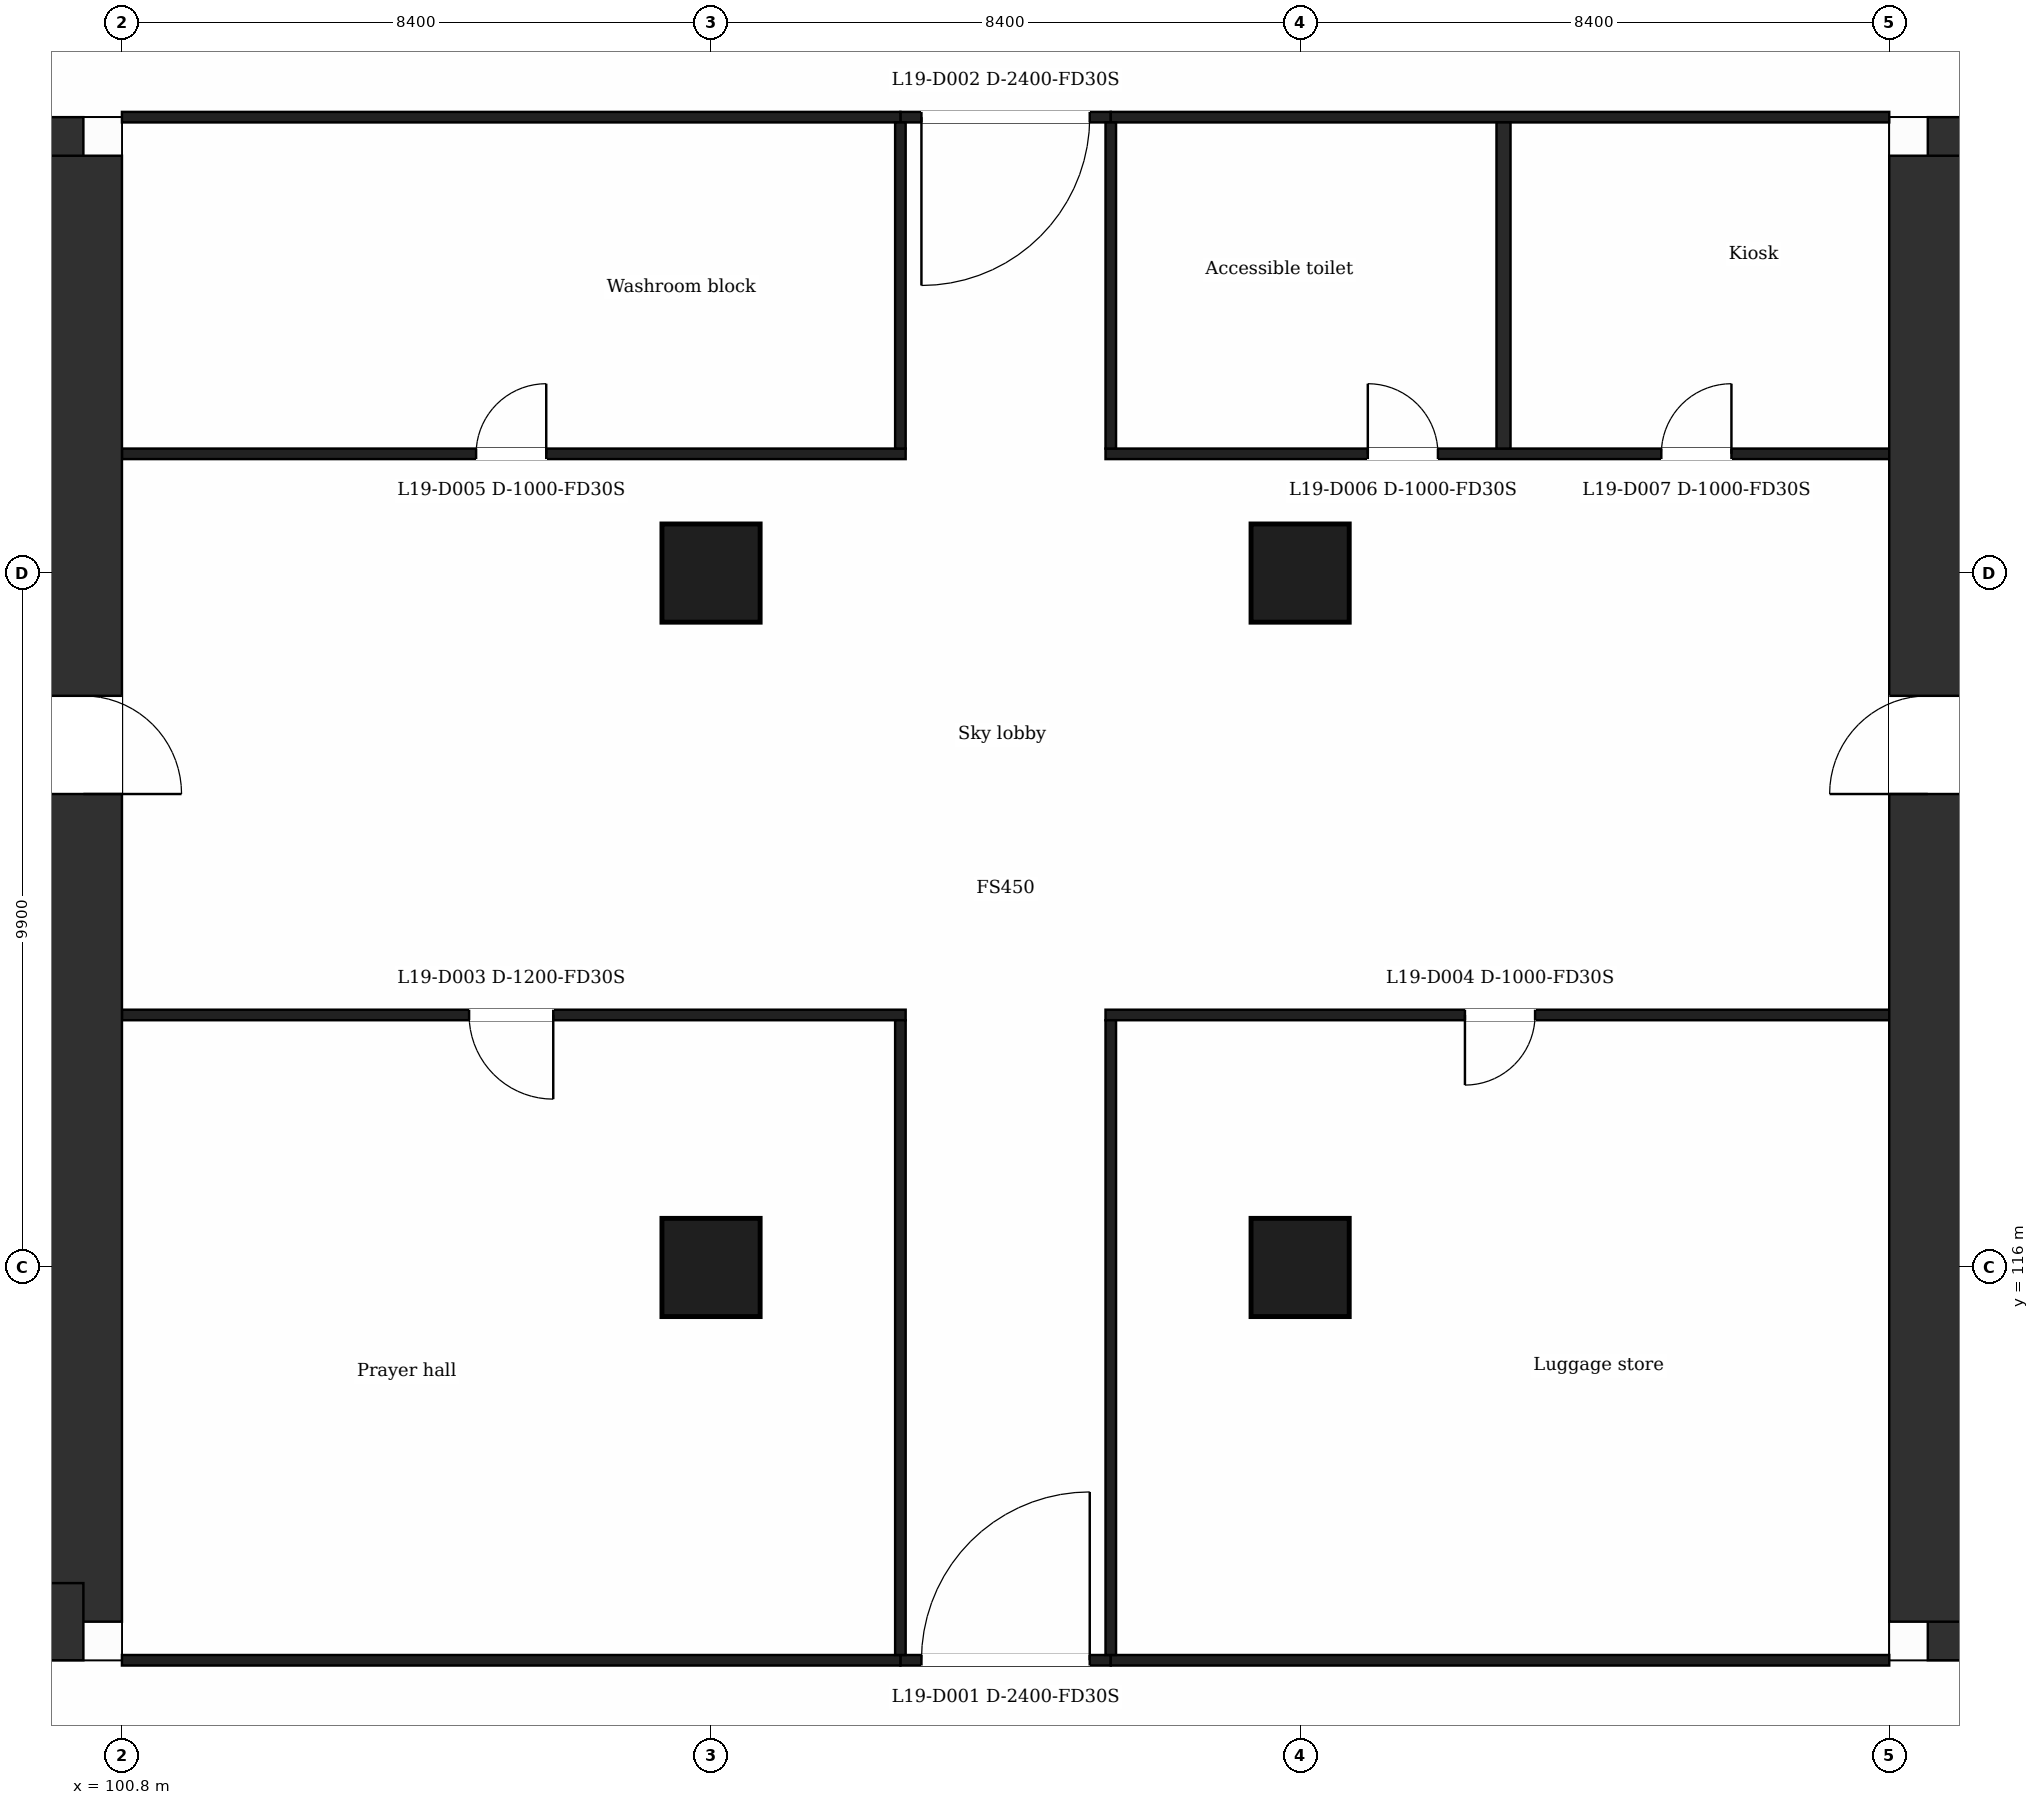
"""IFC4 building model, lengths in metres.
Left out: names, types, materials, properties, quantities, classifications, styles, units other than length and angle.
Written with IfcOpenShell. Run it as: python <this file> out.ifc"""

import sys

from ifc_helpers import new_model, si_unit, direction, frame, frame_2d, origin, origin_2d, place, context, subcontext, project, spatial, rectangle, extrude, element, fill, save


model = new_model("IFC4")
c1 = context("Model", 3, precision=1e-05, world=origin(), true_north=direction((0.0, 1.0)))
c2 = subcontext(c1, "Body", "Model", "MODEL_VIEW")
j1 = project(units=[si_unit("LENGTHUNIT", "METRE"), si_unit("PLANEANGLEUNIT", "RADIAN")], contexts=[c1])
p1 = place(None, origin())
s1 = spatial("IfcSite", under=j1, at=p1, CompositionType="ELEMENT")
p2 = place(p1, origin())
s2 = spatial("IfcBuilding", under=s1, at=p2, CompositionType="ELEMENT")
p3 = place(p2, frame((0.0, 0.0, 86.0)))
s3 = spatial("IfcBuildingStorey", under=s2, at=p3, CompositionType="ELEMENT", Elevation=86.0)
p4 = place(p3, frame((89.112, 131.85, 0.0), z_axis=(0.0, 0.0, 1.0), x_axis=(1.0, 0.0, 0.0)))
e1 = element("IfcWall", 1, at=p4, inside=s3, PredefinedType="SHEAR", context=c2, shape_type="SweptSolid", body=[
    extrude(rectangle(XDim=11.138, YDim=1.1, at=frame_2d((5.569, 0.0))), origin(), (0.0, 0.0, 1.0), 5.0),
])
p5 = place(p4, frame((6.552, 0.0, 0.0)))
e2 = element("IfcOpeningElement", 2, at=p5, cuts=e1, PredefinedType="OPENING", context=c2, shape_type="SweptSolid", body=[
    extrude(rectangle(XDim=1.2, YDim=2.1, at=frame_2d((0.6, 1.05))), frame((0.0, 0.56, 0.0), z_axis=(0.0, -1.0, 0.0), x_axis=(1.0, 0.0, 0.0)), (0.0, 0.0, 1.0), 1.12),
])
p6 = place(p3, frame((100.25, 131.85, 0.0), z_axis=(0.0, 0.0, 1.0), x_axis=(0.0, -1.0, 0.0)))
e3 = element("IfcWall", 3, at=p6, inside=s3, PredefinedType="SHEAR", context=c2, shape_type="SweptSolid", body=[
    extrude(rectangle(XDim=20.9, YDim=1.1, at=frame_2d((10.45, 0.0))), origin(), (0.0, 0.0, 1.0), 5.0),
])
p7 = place(p6, frame((7.7, 0.0, 0.0)))
e4 = element("IfcOpeningElement", 4, at=p7, cuts=e3, PredefinedType="OPENING", context=c2, shape_type="SweptSolid", body=[
    extrude(rectangle(XDim=1.4, YDim=2.1, at=frame_2d((0.7, 1.05))), frame((0.0, 0.56, 0.0), z_axis=(0.0, -1.0, 0.0), x_axis=(1.0, 0.0, 0.0)), (0.0, 0.0, 1.0), 1.12),
])
p8 = place(p3, frame((100.25, 110.95, 0.0), z_axis=(0.0, 0.0, 1.0), x_axis=(-1.0, 0.0, 0.0)))
e5 = element("IfcWall", 5, at=p8, inside=s3, PredefinedType="SHEAR", context=c2, shape_type="SweptSolid", body=[
    extrude(rectangle(XDim=13.952, YDim=1.1, at=frame_2d((6.976, 0.0))), origin(), (0.0, 0.0, 1.0), 5.0),
])
p9 = place(p8, frame((5.748, 0.0, 0.0)))
e6 = element("IfcOpeningElement", 6, at=p9, cuts=e5, PredefinedType="OPENING", context=c2, shape_type="SweptSolid", body=[
    extrude(rectangle(XDim=1.4, YDim=2.1, at=frame_2d((0.7, 1.05))), frame((0.0, 0.56, 0.0), z_axis=(0.0, -1.0, 0.0), x_axis=(1.0, 0.0, 0.0)), (0.0, 0.0, 1.0), 1.12),
])
p10 = place(p3, frame((126.55, 131.85, 0.0), z_axis=(0.0, 0.0, 1.0), x_axis=(1.0, 0.0, 0.0)))
e7 = element("IfcWall", 7, at=p10, inside=s3, PredefinedType="SHEAR", context=c2, shape_type="SweptSolid", body=[
    extrude(rectangle(XDim=11.138, YDim=1.1, at=frame_2d((5.569, 0.0))), origin(), (0.0, 0.0, 1.0), 5.0),
])
p11 = place(p10, frame((3.386, 0.0, 0.0)))
e8 = element("IfcOpeningElement", 8, at=p11, cuts=e7, PredefinedType="OPENING", context=c2, shape_type="SweptSolid", body=[
    extrude(rectangle(XDim=1.2, YDim=2.1, at=frame_2d((0.6, 1.05))), frame((0.0, 0.56, 0.0), z_axis=(0.0, -1.0, 0.0), x_axis=(1.0, 0.0, 0.0)), (0.0, 0.0, 1.0), 1.12),
])
p12 = place(p3, frame((140.502, 110.95, 0.0), z_axis=(0.0, 0.0, 1.0), x_axis=(-1.0, 0.0, 0.0)))
e9 = element("IfcWall", 9, at=p12, inside=s3, PredefinedType="SHEAR", context=c2, shape_type="SweptSolid", body=[
    extrude(rectangle(XDim=13.952, YDim=1.1, at=frame_2d((6.976, 0.0))), origin(), (0.0, 0.0, 1.0), 5.0),
])
p13 = place(p12, frame((6.804, 0.0, 0.0)))
e10 = element("IfcOpeningElement", 10, at=p13, cuts=e9, PredefinedType="OPENING", context=c2, shape_type="SweptSolid", body=[
    extrude(rectangle(XDim=1.4, YDim=2.1, at=frame_2d((0.7, 1.05))), frame((0.0, 0.56, 0.0), z_axis=(0.0, -1.0, 0.0), x_axis=(1.0, 0.0, 0.0)), (0.0, 0.0, 1.0), 1.12),
])
p14 = place(p3, frame((126.55, 110.95, 0.0), z_axis=(0.0, 0.0, 1.0), x_axis=(0.0, 1.0, 0.0)))
e11 = element("IfcWall", 11, at=p14, inside=s3, PredefinedType="SHEAR", context=c2, shape_type="SweptSolid", body=[
    extrude(rectangle(XDim=20.9, YDim=1.1, at=frame_2d((10.45, 0.0))), origin(), (0.0, 0.0, 1.0), 5.0),
])
p15 = place(p14, frame((11.8, 0.0, 0.0)))
e12 = element("IfcOpeningElement", 12, at=p15, cuts=e11, PredefinedType="OPENING", context=c2, shape_type="SweptSolid", body=[
    extrude(rectangle(XDim=1.4, YDim=2.1, at=frame_2d((0.7, 1.05))), frame((0.0, 0.56, 0.0), z_axis=(0.0, -1.0, 0.0), x_axis=(1.0, 0.0, 0.0)), (0.0, 0.0, 1.0), 1.12),
])
for number, where, z_axis, x_axis in (
    (13, (109.2, 116.0, 0.0), (0.0, 0.0, 1.0), (1.0, 0.0, 0.0)),
    (14, (117.6, 116.0, 0.0), (0.0, 0.0, 1.0), (1.0, 0.0, 0.0)),
    (15, (109.2, 125.9, 0.0), (0.0, 0.0, 1.0), (1.0, 0.0, 0.0)),
    (16, (117.6, 125.9, 0.0), (0.0, 0.0, 1.0), (1.0, 0.0, 0.0)),
):
    element("IfcColumn", number, at=place(p3, frame(where, z_axis=z_axis, x_axis=x_axis)), inside=s3, PredefinedType="COLUMN", context=c2, shape_type="SweptSolid", body=[
        extrude(rectangle(XDim=1.4, YDim=1.4, at=origin_2d()), origin(), (0.0, 0.0, 1.0), 5.0),
    ])
p16 = place(p3, frame((111.9, 110.4, 0.0), z_axis=(0.0, 0.0, 1.0), x_axis=(1.0, 0.0, 0.0)))
e17 = element("IfcWall", 17, at=p16, inside=s3, PredefinedType="PARTITIONING", context=c2, shape_type="SweptSolid", body=[
    extrude(rectangle(XDim=3.0, YDim=0.15, at=frame_2d((1.5, 0.0))), origin(), (0.0, 0.0, 1.0), 4.68),
])
p17 = place(p16, frame((0.3, 0.0, 0.0)))
e18 = element("IfcOpeningElement", 18, at=p17, cuts=e17, PredefinedType="OPENING", context=c2, shape_type="SweptSolid", body=[
    extrude(rectangle(XDim=2.4, YDim=2.1, at=frame_2d((1.2, 1.05))), frame((0.0, 0.085, 0.0), z_axis=(0.0, -1.0, 0.0), x_axis=(1.0, 0.0, 0.0)), (0.0, 0.0, 1.0), 0.17),
])
p18 = place(p3, frame((100.8, 110.4, 0.0), z_axis=(0.0, 0.0, 1.0), x_axis=(1.0, 0.0, 0.0)))
e19 = element("IfcWall", 19, at=p18, inside=s3, PredefinedType="PARTITIONING", context=c2, shape_type="SweptSolid", body=[
    extrude(rectangle(XDim=11.1, YDim=0.15, at=frame_2d((5.55, 0.0))), origin(), (0.0, 0.0, 1.0), 4.68),
])
p19 = place(p3, frame((114.9, 110.4, 0.0), z_axis=(0.0, 0.0, 1.0), x_axis=(1.0, 0.0, 0.0)))
e20 = element("IfcWall", 20, at=p19, inside=s3, PredefinedType="PARTITIONING", context=c2, shape_type="SweptSolid", body=[
    extrude(rectangle(XDim=11.1, YDim=0.15, at=frame_2d((5.55, 0.0))), origin(), (0.0, 0.0, 1.0), 4.68),
])
p20 = place(p3, frame((100.8, 119.6, 0.0), z_axis=(0.0, 0.0, 1.0), x_axis=(1.0, 0.0, 0.0)))
e21 = element("IfcWall", 21, at=p20, inside=s3, PredefinedType="PARTITIONING", context=c2, shape_type="SweptSolid", body=[
    extrude(rectangle(XDim=11.175, YDim=0.15, at=frame_2d((5.587, 0.0))), origin(), (0.0, 0.0, 1.0), 4.68),
])
p21 = place(p20, frame((4.95, 0.0, 0.0)))
e22 = element("IfcOpeningElement", 22, at=p21, cuts=e21, PredefinedType="OPENING", context=c2, shape_type="SweptSolid", body=[
    extrude(rectangle(XDim=1.2, YDim=2.1, at=frame_2d((0.6, 1.05))), frame((0.0, 0.085, 0.0), z_axis=(0.0, -1.0, 0.0), x_axis=(1.0, 0.0, 0.0)), (0.0, 0.0, 1.0), 0.17),
])
p22 = place(p3, frame((114.825, 119.6, 0.0), z_axis=(0.0, 0.0, 1.0), x_axis=(1.0, 0.0, 0.0)))
e23 = element("IfcWall", 23, at=p22, inside=s3, PredefinedType="PARTITIONING", context=c2, shape_type="SweptSolid", body=[
    extrude(rectangle(XDim=11.175, YDim=0.15, at=frame_2d((5.587, 0.0))), origin(), (0.0, 0.0, 1.0), 4.68),
])
p23 = place(p22, frame((5.125, 0.0, 0.0)))
e24 = element("IfcOpeningElement", 24, at=p23, cuts=e23, PredefinedType="OPENING", context=c2, shape_type="SweptSolid", body=[
    extrude(rectangle(XDim=1.0, YDim=2.1, at=frame_2d((0.5, 1.05))), frame((0.0, 0.085, 0.0), z_axis=(0.0, -1.0, 0.0), x_axis=(1.0, 0.0, 0.0)), (0.0, 0.0, 1.0), 0.17),
])
p24 = place(p3, frame((100.8, 127.6, 0.0), z_axis=(0.0, 0.0, 1.0), x_axis=(1.0, 0.0, 0.0)))
e25 = element("IfcWall", 25, at=p24, inside=s3, PredefinedType="PARTITIONING", context=c2, shape_type="SweptSolid", body=[
    extrude(rectangle(XDim=11.175, YDim=0.15, at=frame_2d((5.587, 0.0))), origin(), (0.0, 0.0, 1.0), 4.68),
])
p25 = place(p24, frame((5.05, 0.0, 0.0)))
e26 = element("IfcOpeningElement", 26, at=p25, cuts=e25, PredefinedType="OPENING", context=c2, shape_type="SweptSolid", body=[
    extrude(rectangle(XDim=1.0, YDim=2.1, at=frame_2d((0.5, 1.05))), frame((0.0, 0.085, 0.0), z_axis=(0.0, -1.0, 0.0), x_axis=(1.0, 0.0, 0.0)), (0.0, 0.0, 1.0), 0.17),
])
p26 = place(p3, frame((114.825, 127.6, 0.0), z_axis=(0.0, 0.0, 1.0), x_axis=(1.0, 0.0, 0.0)))
e27 = element("IfcWall", 27, at=p26, inside=s3, PredefinedType="PARTITIONING", context=c2, shape_type="SweptSolid", body=[
    extrude(rectangle(XDim=11.175, YDim=0.15, at=frame_2d((5.587, 0.0))), origin(), (0.0, 0.0, 1.0), 4.68),
])
p27 = place(p26, frame((3.74, 0.0, 0.0)))
e28 = element("IfcOpeningElement", 28, at=p27, cuts=e27, PredefinedType="OPENING", context=c2, shape_type="SweptSolid", body=[
    extrude(rectangle(XDim=1.0, YDim=2.1, at=frame_2d((0.5, 1.05))), frame((0.0, 0.085, 0.0), z_axis=(0.0, -1.0, 0.0), x_axis=(1.0, 0.0, 0.0)), (0.0, 0.0, 1.0), 0.17),
])
p28 = place(p26, frame((7.925, 0.0, 0.0)))
e29 = element("IfcOpeningElement", 29, at=p28, cuts=e27, PredefinedType="OPENING", context=c2, shape_type="SweptSolid", body=[
    extrude(rectangle(XDim=1.0, YDim=2.1, at=frame_2d((0.5, 1.05))), frame((0.0, 0.085, 0.0), z_axis=(0.0, -1.0, 0.0), x_axis=(1.0, 0.0, 0.0)), (0.0, 0.0, 1.0), 0.17),
])
p29 = place(p3, frame((111.9, 132.4, 0.0), z_axis=(0.0, 0.0, 1.0), x_axis=(1.0, 0.0, 0.0)))
e30 = element("IfcWall", 30, at=p29, inside=s3, PredefinedType="PARTITIONING", context=c2, shape_type="SweptSolid", body=[
    extrude(rectangle(XDim=3.0, YDim=0.15, at=frame_2d((1.5, 0.0))), origin(), (0.0, 0.0, 1.0), 4.68),
])
p30 = place(p29, frame((0.3, 0.0, 0.0)))
e31 = element("IfcOpeningElement", 31, at=p30, cuts=e30, PredefinedType="OPENING", context=c2, shape_type="SweptSolid", body=[
    extrude(rectangle(XDim=2.4, YDim=2.1, at=frame_2d((1.2, 1.05))), frame((0.0, 0.085, 0.0), z_axis=(0.0, -1.0, 0.0), x_axis=(1.0, 0.0, 0.0)), (0.0, 0.0, 1.0), 0.17),
])
p31 = place(p3, frame((100.8, 132.4, 0.0), z_axis=(0.0, 0.0, 1.0), x_axis=(1.0, 0.0, 0.0)))
e32 = element("IfcWall", 32, at=p31, inside=s3, PredefinedType="PARTITIONING", context=c2, shape_type="SweptSolid", body=[
    extrude(rectangle(XDim=11.1, YDim=0.15, at=frame_2d((5.55, 0.0))), origin(), (0.0, 0.0, 1.0), 4.68),
])
p32 = place(p3, frame((114.9, 132.4, 0.0), z_axis=(0.0, 0.0, 1.0), x_axis=(1.0, 0.0, 0.0)))
e33 = element("IfcWall", 33, at=p32, inside=s3, PredefinedType="PARTITIONING", context=c2, shape_type="SweptSolid", body=[
    extrude(rectangle(XDim=11.1, YDim=0.15, at=frame_2d((5.55, 0.0))), origin(), (0.0, 0.0, 1.0), 4.68),
])
p33 = place(p3, frame((111.9, 110.475, 0.0), z_axis=(0.0, 0.0, 1.0), x_axis=(0.0, 1.0, 0.0)))
e34 = element("IfcWall", 34, at=p33, inside=s3, PredefinedType="PARTITIONING", context=c2, shape_type="SweptSolid", body=[
    extrude(rectangle(XDim=9.05, YDim=0.15, at=frame_2d((4.525, 0.0))), origin(), (0.0, 0.0, 1.0), 4.68),
])
p34 = place(p3, frame((111.9, 127.675, 0.0), z_axis=(0.0, 0.0, 1.0), x_axis=(0.0, 1.0, 0.0)))
e35 = element("IfcWall", 35, at=p34, inside=s3, PredefinedType="PARTITIONING", context=c2, shape_type="SweptSolid", body=[
    extrude(rectangle(XDim=4.65, YDim=0.15, at=frame_2d((2.325, 0.0))), origin(), (0.0, 0.0, 1.0), 4.68),
])
p35 = place(p3, frame((114.9, 110.475, 0.0), z_axis=(0.0, 0.0, 1.0), x_axis=(0.0, 1.0, 0.0)))
e36 = element("IfcWall", 36, at=p35, inside=s3, PredefinedType="PARTITIONING", context=c2, shape_type="SweptSolid", body=[
    extrude(rectangle(XDim=9.05, YDim=0.15, at=frame_2d((4.525, 0.0))), origin(), (0.0, 0.0, 1.0), 4.68),
])
p36 = place(p3, frame((114.9, 127.675, 0.0), z_axis=(0.0, 0.0, 1.0), x_axis=(0.0, 1.0, 0.0)))
e37 = element("IfcWall", 37, at=p36, inside=s3, PredefinedType="PARTITIONING", context=c2, shape_type="SweptSolid", body=[
    extrude(rectangle(XDim=4.65, YDim=0.15, at=frame_2d((2.325, 0.0))), origin(), (0.0, 0.0, 1.0), 4.68),
])
p37 = place(p3, frame((120.5, 127.675, 0.0), z_axis=(0.0, 0.0, 1.0), x_axis=(0.0, 1.0, 0.0)))
e38 = element("IfcWall", 38, at=p37, inside=s3, PredefinedType="PARTITIONING", context=c2, shape_type="SweptSolid", body=[
    extrude(rectangle(XDim=4.65, YDim=0.2, at=frame_2d((2.325, 0.0))), origin(), (0.0, 0.0, 1.0), 4.68),
])
p38 = place(p17, origin())
e39 = element("IfcDoor", 39, at=p38, inside=s3, OperationType="SINGLE_SWING_RIGHT", PredefinedType="DOOR", context=c2, shape_type="SweptSolid", body=[
    extrude(rectangle(XDim=2.4, YDim=2.1, at=frame_2d((1.2, 1.05))), frame((0.0, 0.025, 0.0), z_axis=(0.0, -1.0, 0.0), x_axis=(1.0, 0.0, 0.0)), (0.0, 0.0, 1.0), 0.05),
])
fill(e18, e39)
p39 = place(p30, origin())
e40 = element("IfcDoor", 40, at=p39, inside=s3, OperationType="SINGLE_SWING_LEFT", PredefinedType="DOOR", context=c2, shape_type="SweptSolid", body=[
    extrude(rectangle(XDim=2.4, YDim=2.1, at=frame_2d((1.2, 1.05))), frame((0.0, 0.025, 0.0), z_axis=(0.0, -1.0, 0.0), x_axis=(1.0, 0.0, 0.0)), (0.0, 0.0, 1.0), 0.05),
])
fill(e31, e40)
p40 = place(p21, origin())
e41 = element("IfcDoor", 41, at=p40, inside=s3, OperationType="SINGLE_SWING_RIGHT", PredefinedType="DOOR", context=c2, shape_type="SweptSolid", body=[
    extrude(rectangle(XDim=1.2, YDim=2.1, at=frame_2d((0.6, 1.05))), frame((0.0, 0.025, 0.0), z_axis=(0.0, -1.0, 0.0), x_axis=(1.0, 0.0, 0.0)), (0.0, 0.0, 1.0), 0.05),
])
fill(e22, e41)
p41 = place(p23, origin())
e42 = element("IfcDoor", 42, at=p41, inside=s3, OperationType="SINGLE_SWING_LEFT", PredefinedType="DOOR", context=c2, shape_type="SweptSolid", body=[
    extrude(rectangle(XDim=1.0, YDim=2.1, at=frame_2d((0.5, 1.05))), frame((0.0, 0.025, 0.0), z_axis=(0.0, -1.0, 0.0), x_axis=(1.0, 0.0, 0.0)), (0.0, 0.0, 1.0), 0.05),
])
fill(e24, e42)
p42 = place(p25, origin())
e43 = element("IfcDoor", 43, at=p42, inside=s3, OperationType="SINGLE_SWING_RIGHT", PredefinedType="DOOR", context=c2, shape_type="SweptSolid", body=[
    extrude(rectangle(XDim=1.0, YDim=2.1, at=frame_2d((0.5, 1.05))), frame((0.0, 0.025, 0.0), z_axis=(0.0, -1.0, 0.0), x_axis=(1.0, 0.0, 0.0)), (0.0, 0.0, 1.0), 0.05),
])
fill(e26, e43)
p43 = place(p27, origin())
e44 = element("IfcDoor", 44, at=p43, inside=s3, OperationType="SINGLE_SWING_LEFT", PredefinedType="DOOR", context=c2, shape_type="SweptSolid", body=[
    extrude(rectangle(XDim=1.0, YDim=2.1, at=frame_2d((0.5, 1.05))), frame((0.0, 0.025, 0.0), z_axis=(0.0, -1.0, 0.0), x_axis=(1.0, 0.0, 0.0)), (0.0, 0.0, 1.0), 0.05),
])
fill(e28, e44)
p44 = place(p28, origin())
e45 = element("IfcDoor", 45, at=p44, inside=s3, OperationType="SINGLE_SWING_RIGHT", PredefinedType="DOOR", context=c2, shape_type="SweptSolid", body=[
    extrude(rectangle(XDim=1.0, YDim=2.1, at=frame_2d((0.5, 1.05))), frame((0.0, 0.025, 0.0), z_axis=(0.0, -1.0, 0.0), x_axis=(1.0, 0.0, 0.0)), (0.0, 0.0, 1.0), 0.05),
])
fill(e29, e45)
p45 = place(p7, origin())
e46 = element("IfcDoor", 46, at=p45, inside=s3, OperationType="SINGLE_SWING_RIGHT", PredefinedType="DOOR", context=c2, shape_type="SweptSolid", body=[
    extrude(rectangle(XDim=1.4, YDim=2.1, at=frame_2d((0.7, 1.05))), frame((0.0, 0.025, 0.0), z_axis=(0.0, -1.0, 0.0), x_axis=(1.0, 0.0, 0.0)), (0.0, 0.0, 1.0), 0.05),
])
fill(e4, e46)
p46 = place(p15, origin())
e47 = element("IfcDoor", 47, at=p46, inside=s3, OperationType="SINGLE_SWING_LEFT", PredefinedType="DOOR", context=c2, shape_type="SweptSolid", body=[
    extrude(rectangle(XDim=1.4, YDim=2.1, at=frame_2d((0.7, 1.05))), frame((0.0, 0.025, 0.0), z_axis=(0.0, -1.0, 0.0), x_axis=(1.0, 0.0, 0.0)), (0.0, 0.0, 1.0), 0.05),
])
fill(e12, e47)
save(model, sys.argv[1])
